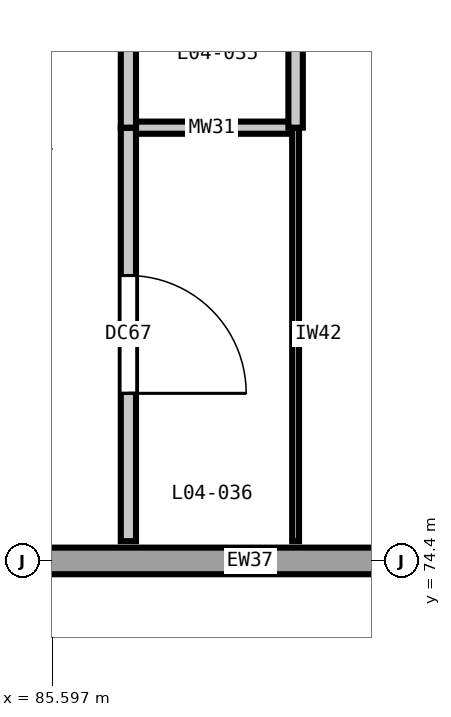
"""IFC4 building model, lengths in metres.
Left out: names, types, materials, properties, quantities, classifications, styles, units other than length and angle.
Written with IfcOpenShell. Run it as: python <this file> out.ifc"""

import sys

from ifc_helpers import new_model, si_unit, direction, frame, frame_2d, origin, place, context, subcontext, project, spatial, rectangle, extrude, element, fill, save


model = new_model("IFC4")
c1 = context("Model", 3, precision=1e-05, world=origin(), true_north=direction((0.0, 1.0)))
c2 = subcontext(c1, "Body", "Model", "MODEL_VIEW")
j1 = project(units=[si_unit("LENGTHUNIT", "METRE"), si_unit("PLANEANGLEUNIT", "RADIAN")], contexts=[c1])
p1 = place(None, origin())
s1 = spatial("IfcSite", under=j1, at=p1, CompositionType="ELEMENT")
p2 = place(p1, origin())
s2 = spatial("IfcBuilding", under=s1, at=p2, CompositionType="ELEMENT")
p3 = place(p2, frame((0.0, 0.0, 20.4)))
s3 = spatial("IfcBuildingStorey", under=s2, at=p3, CompositionType="ELEMENT", Elevation=20.4)
p4 = place(p3, frame((92.127, 74.4, 0.0), z_axis=(0.0, 0.0, 1.0), x_axis=(-1.0, 0.0, 0.0)))
e1 = element("IfcWall", 1, at=p4, inside=s3, PredefinedType="SOLIDWALL", context=c2, shape_type="SweptSolid", body=[
    extrude(rectangle(XDim=7.854, YDim=0.35, at=frame_2d((3.927, 0.0))), origin(), (0.0, 0.0, 1.0), 3.48),
])
p5 = place(p3, frame((86.6, 80.1, 0.0), z_axis=(0.0, 0.0, 1.0), x_axis=(1.0, 0.0, 0.0)))
e2 = element("IfcWall", 2, at=p5, inside=s3, PredefinedType="PLUMBINGWALL", context=c2, shape_type="SweptSolid", body=[
    extrude(rectangle(XDim=2.2, YDim=0.16, at=frame_2d((1.1, 0.0))), origin(), (0.0, 0.0, 1.0), 3.82),
])
p6 = place(p3, frame((86.6, 74.66, 0.0), z_axis=(0.0, 0.0, 1.0), x_axis=(0.0, 1.0, 0.0)))
e3 = element("IfcWall", 3, at=p6, inside=s3, PredefinedType="PARTITIONING", context=c2, shape_type="SweptSolid", body=[
    extrude(rectangle(XDim=5.44, YDim=0.2, at=frame_2d((2.72, 0.0))), origin(), (0.0, 0.0, 1.0), 3.82),
])
p7 = place(p6, frame((1.945, 0.0, 0.0)))
e4 = element("IfcOpeningElement", 4, at=p7, cuts=e3, PredefinedType="OPENING", context=c2, shape_type="SweptSolid", body=[
    extrude(rectangle(XDim=1.55, YDim=2.25, at=frame_2d((0.775, 1.125))), frame((0.0, 0.11, 0.0), z_axis=(0.0, -1.0, 0.0), x_axis=(1.0, 0.0, 0.0)), (0.0, 0.0, 1.0), 0.22),
])
p8 = place(p3, frame((86.6, 80.1, 0.0), z_axis=(0.0, 0.0, 1.0), x_axis=(0.0, 1.0, 0.0)))
e5 = element("IfcWall", 5, at=p8, inside=s3, PredefinedType="PARTITIONING", context=c2, shape_type="SweptSolid", body=[
    extrude(rectangle(XDim=5.7, YDim=0.2, at=frame_2d((2.85, 0.0))), origin(), (0.0, 0.0, 1.0), 3.82),
])
p9 = place(p8, frame((2.39, 0.0, 0.0)))
e6 = element("IfcOpeningElement", 6, at=p9, cuts=e5, PredefinedType="OPENING", context=c2, shape_type="SweptSolid", body=[
    extrude(rectangle(XDim=0.92, YDim=2.1, at=frame_2d((0.46, 1.05))), frame((0.0, 0.11, 0.0), z_axis=(0.0, -1.0, 0.0), x_axis=(1.0, 0.0, 0.0)), (0.0, 0.0, 1.0), 0.22),
])
p10 = place(p3, frame((88.8, 74.66, 0.0), z_axis=(0.0, 0.0, 1.0), x_axis=(0.0, 1.0, 0.0)))
e7 = element("IfcWall", 7, at=p10, inside=s3, PredefinedType="PARTITIONING", context=c2, shape_type="SweptSolid", body=[
    extrude(rectangle(XDim=5.44, YDim=0.09, at=frame_2d((2.72, 0.0))), origin(), (0.0, 0.0, 1.0), 3.82),
])
p11 = place(p3, frame((88.8, 80.1, 0.0), z_axis=(0.0, 0.0, 1.0), x_axis=(0.0, 1.0, 0.0)))
e8 = element("IfcWall", 8, at=p11, inside=s3, PredefinedType="PLUMBINGWALL", context=c2, shape_type="SweptSolid", body=[
    extrude(rectangle(XDim=5.7, YDim=0.19, at=frame_2d((2.85, 0.0))), origin(), (0.0, 0.0, 1.0), 3.82),
])
p12 = place(p7, frame((1.55, 0.0, 0.0), z_axis=(0.0, 0.0, 1.0), x_axis=(-1.0, 0.0, 0.0)))
e9 = element("IfcDoor", 9, at=p12, inside=s3, OperationType="SINGLE_SWING_RIGHT", PredefinedType="DOOR", context=c2, shape_type="SweptSolid", body=[
    extrude(rectangle(XDim=1.55, YDim=2.25, at=frame_2d((0.775, 1.125))), frame((0.0, 0.025, 0.0), z_axis=(0.0, -1.0, 0.0), x_axis=(1.0, 0.0, 0.0)), (0.0, 0.0, 1.0), 0.05),
])
fill(e4, e9)
save(model, sys.argv[1])
